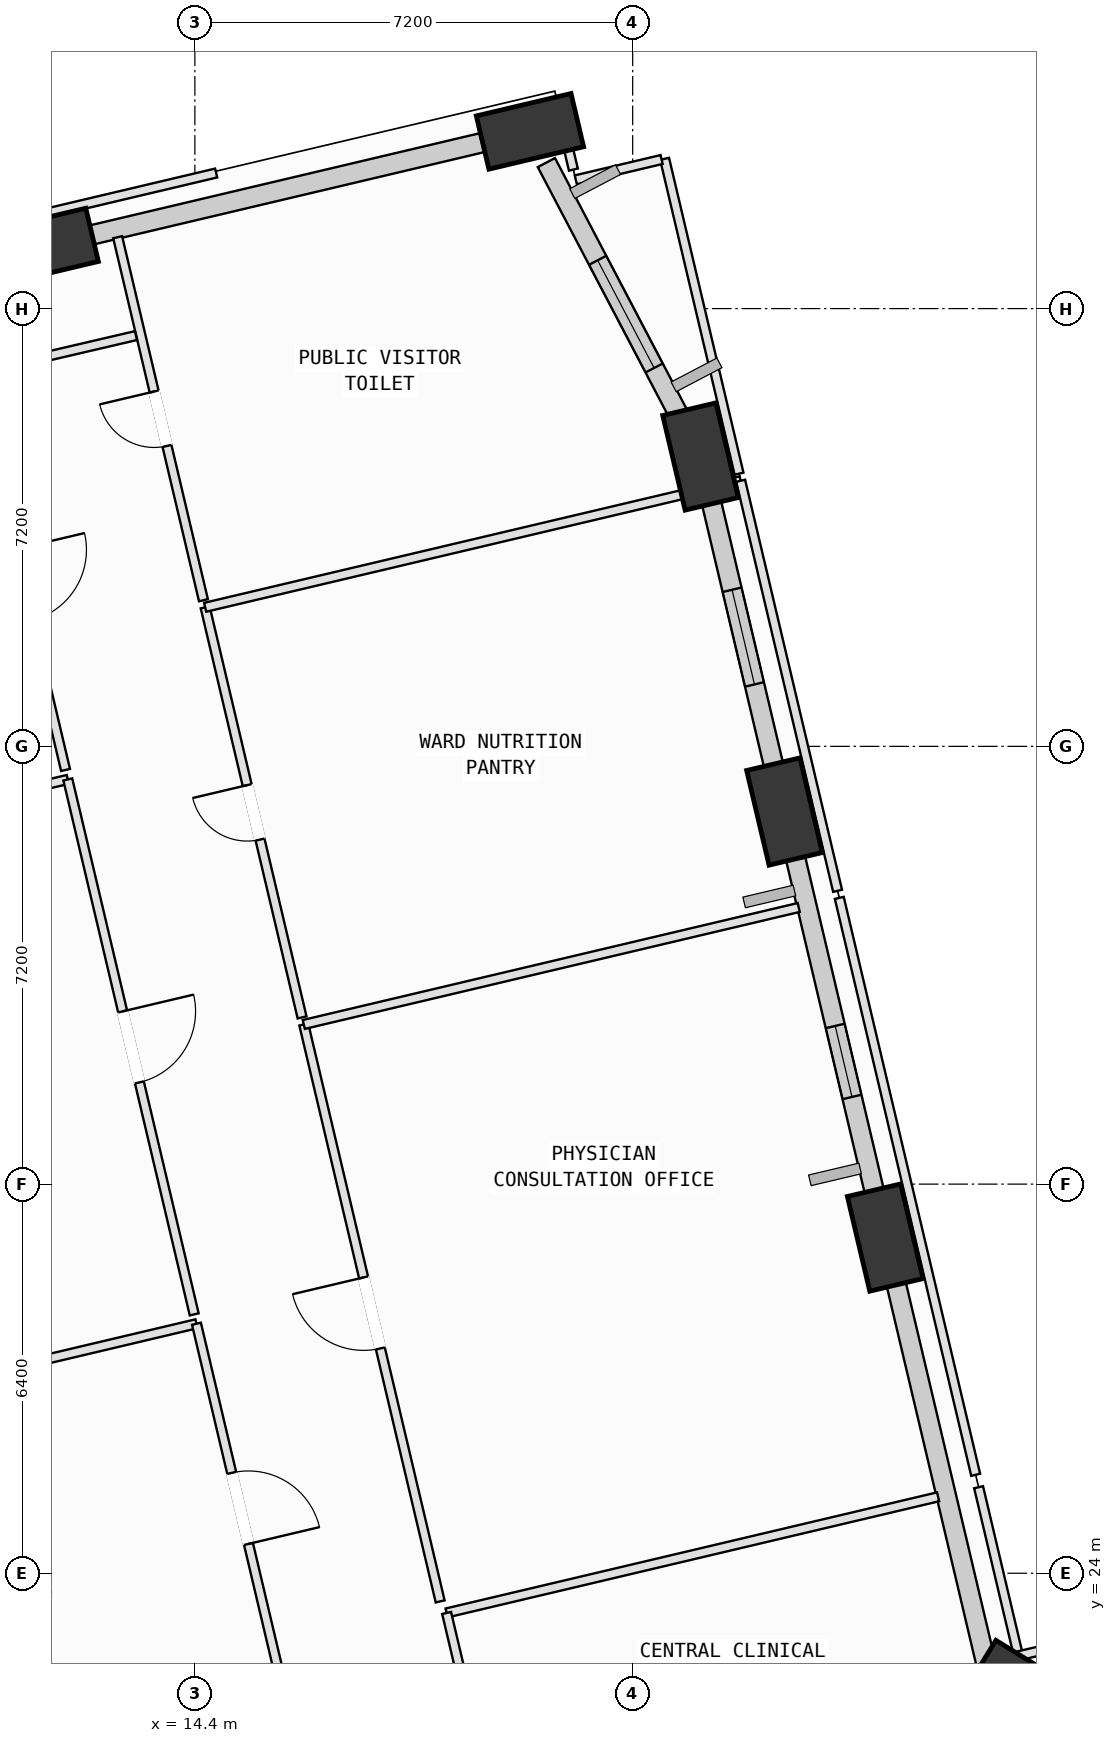
"""IFC4 building model, lengths in metres.
Left out: names, types, materials, properties, quantities, classifications, styles, units other than length and angle.
Written with IfcOpenShell. Run it as: python <this file> out.ifc"""

import sys

from ifc_helpers import new_model, si_unit, direction, frame, frame_2d, origin, origin_2d, place, context, subcontext, project, spatial, rectangle, extrude, element, fill, save


model = new_model("IFC4")
c1 = context("Model", 3, precision=1e-05, world=origin(), true_north=direction((0.0, 1.0)))
c2 = subcontext(c1, "Body", "Model", "MODEL_VIEW")
j1 = project(units=[si_unit("LENGTHUNIT", "METRE"), si_unit("PLANEANGLEUNIT", "RADIAN")], contexts=[c1])
p1 = place(None, origin())
s1 = spatial("IfcSite", under=j1, at=p1, CompositionType="ELEMENT")
p2 = place(p1, origin())
s2 = spatial("IfcBuilding", under=s1, at=p2, CompositionType="ELEMENT")
p3 = place(p2, frame((0.0, 0.0, 79.0)))
s3 = spatial("IfcBuildingStorey", under=s2, at=p3, CompositionType="ELEMENT", Elevation=79.0)
p4 = place(p3, frame((27.536, 21.979, 0.002), z_axis=(0.011862879742, -0.025016539145, 0.999616648948), x_axis=(0.110387943511, 0.993609384183, 0.023556179442)))
e1 = element("IfcColumn", 1, at=p4, inside=s3, PredefinedType="COLUMN", context=c2, shape_type="SweptSolid", body=[
    extrude(rectangle(XDim=1.6, YDim=0.9, at=origin_2d()), origin(), (0.0, 0.0, 1.0), 3.972),
])
p5 = place(p3, frame((25.753, 29.521, 0.002), z_axis=(-0.019332928217, -0.032693582431, 0.999278423441), x_axis=(0.296974112484, 0.954169844595, 0.036963281503)))
e2 = element("IfcColumn", 2, at=p5, inside=s3, PredefinedType="COLUMN", context=c2, shape_type="SweptSolid", body=[
    extrude(rectangle(XDim=1.6, YDim=0.9, at=origin_2d()), origin(), (0.0, 0.0, 1.0), 3.965),
])
p6 = place(p3, frame((24.097, 36.528, 0.002), z_axis=(-0.048168082707, -0.039696930806, 0.998050093679), x_axis=(0.603230951511, 0.795250021524, 0.060743908373)))
e3 = element("IfcColumn", 3, at=p6, inside=s3, PredefinedType="COLUMN", context=c2, shape_type="SweptSolid", body=[
    extrude(rectangle(XDim=1.6, YDim=0.9, at=origin_2d()), origin(), (0.0, 0.0, 1.0), 3.948),
])
p7 = place(p3, frame((22.717, 42.367, 0.002), z_axis=(-0.072160803542, -0.045542587962, 0.996352694137), x_axis=(0.697196380934, 0.71205424328, 0.083041923377)))
e4 = element("IfcColumn", 4, at=p7, inside=s3, PredefinedType="COLUMN", context=c2, shape_type="SweptSolid", body=[
    extrude(rectangle(XDim=1.6, YDim=0.9, at=origin_2d()), origin(), (0.0, 0.0, 1.0), 3.935),
])
p8 = place(p3, frame((19.911, 47.715, 0.002), z_axis=(-0.0939135141, -0.057151316147, 0.993938619298), x_axis=(0.701244074695, -0.712472540273, 0.025290849368)))
e5 = element("IfcColumn", 5, at=p8, inside=s3, PredefinedType="COLUMN", context=c2, shape_type="SweptSolid", body=[
    extrude(rectangle(XDim=1.6, YDim=0.9, at=origin_2d()), origin(), (0.0, 0.0, 1.0), 3.951),
])
p9 = place(p3, frame((11.931, 45.829, 0.002), z_axis=(-0.085748490586, -0.08982880809, 0.992259029487), x_axis=(0.861560195965, -0.506850916025, 0.028568823104)))
e6 = element("IfcColumn", 6, at=p9, inside=s3, PredefinedType="COLUMN", context=c2, shape_type="SweptSolid", body=[
    extrude(rectangle(XDim=1.6, YDim=0.9, at=origin_2d()), origin(), (0.0, 0.0, 1.0), 3.949),
])
p10 = place(p3, frame((28.137, 22.121, 0.0), z_axis=(0.0, 0.0, 1.0), x_axis=(0.973179415544, 0.230047441111, 0.0)))
e7 = element("IfcWall", 7, at=p10, inside=s3, PredefinedType="SOLIDWALL", context=c2, shape_type="SweptSolid", body=[
    extrude(rectangle(XDim=5.736, YDim=0.32, at=frame_2d((2.868, 0.0))), origin(), (0.0, 0.0, 1.0), 3.085),
])
p11 = place(p10, frame((0.928, 0.0, 0.75)))
e8 = element("IfcOpeningElement", 8, at=p11, cuts=e7, PredefinedType="OPENING", context=c2, shape_type="SweptSolid", body=[
    extrude(rectangle(XDim=1.4, YDim=1.85, at=frame_2d((0.7, 0.925))), frame((0.0, 0.17, 0.0), z_axis=(0.0, -1.0, 0.0), x_axis=(1.0, 0.0, 0.0)), (0.0, 0.0, 1.0), 0.34),
])
p12 = place(p3, frame((27.409, 22.518, 0.0), z_axis=(0.0, 0.0, 1.0), x_axis=(-0.230053111414, 0.973178075138, 0.0)))
e9 = element("IfcWall", 9, at=p12, inside=s3, PredefinedType="SOLIDWALL", context=c2, shape_type="SweptSolid", body=[
    extrude(rectangle(XDim=6.536, YDim=0.32, at=frame_2d((3.268, 0.0))), origin(), (0.0, 0.0, 1.0), 2.785),
])
p13 = place(p3, frame((25.627, 30.058, 0.0), z_axis=(0.0, 0.0, 1.0), x_axis=(-0.230071724751, 0.973173674875, 0.0)))
e10 = element("IfcWall", 10, at=p13, inside=s3, PredefinedType="SOLIDWALL", context=c2, shape_type="SweptSolid", body=[
    extrude(rectangle(XDim=5.997, YDim=0.32, at=frame_2d((2.998, 0.0))), origin(), (0.0, 0.0, 1.0), 3.085),
])
p14 = place(p13, frame((1.825, 0.0, 0.75)))
e11 = element("IfcOpeningElement", 11, at=p14, cuts=e10, PredefinedType="OPENING", context=c2, shape_type="SweptSolid", body=[
    extrude(rectangle(XDim=1.2, YDim=1.75, at=frame_2d((0.6, 0.875))), frame((0.0, 0.17, 0.0), z_axis=(0.0, -1.0, 0.0), x_axis=(1.0, 0.0, 0.0)), (0.0, 0.0, 1.0), 0.34),
])
p15 = place(p3, frame((23.972, 37.056, 0.0), z_axis=(0.0, 0.0, 1.0), x_axis=(-0.230076078853, 0.973172645495, 0.0)))
e12 = element("IfcWall", 12, at=p15, inside=s3, PredefinedType="SOLIDWALL", context=c2, shape_type="SweptSolid", body=[
    extrude(rectangle(XDim=4.816, YDim=0.32, at=frame_2d((2.408, 0.0))), origin(), (0.0, 0.0, 1.0), 3.085),
])
p16 = place(p15, frame((1.606, 0.0, 0.75)))
e13 = element("IfcOpeningElement", 13, at=p16, cuts=e12, PredefinedType="OPENING", context=c2, shape_type="SweptSolid", body=[
    extrude(rectangle(XDim=1.6, YDim=1.95, at=frame_2d((0.8, 0.975))), frame((0.0, 0.17, 0.0), z_axis=(0.0, -1.0, 0.0), x_axis=(1.0, 0.0, 0.0)), (0.0, 0.0, 1.0), 0.34),
])
p17 = place(p3, frame((20.181, 47.201, 0.0), z_axis=(0.0, 0.0, 1.0), x_axis=(0.464527536286, -0.885558675657, 0.0)))
e14 = element("IfcWall", 14, at=p17, inside=s3, PredefinedType="SOLIDWALL", context=c2, shape_type="SweptSolid", body=[
    extrude(rectangle(XDim=4.889, YDim=0.32, at=frame_2d((2.444, 0.0))), origin(), (0.0, 0.0, 1.0), 3.085),
])
p18 = place(p17, frame((1.815, 0.0, 0.75)))
e15 = element("IfcOpeningElement", 15, at=p18, cuts=e14, PredefinedType="OPENING", context=c2, shape_type="SweptSolid", body=[
    extrude(rectangle(XDim=2.0, YDim=1.95, at=frame_2d((1.0, 0.975))), frame((0.0, 0.17, 0.0), z_axis=(0.0, -1.0, 0.0), x_axis=(1.0, 0.0, 0.0)), (0.0, 0.0, 1.0), 0.34),
])
p19 = place(p3, frame((12.303, 45.917, 0.0), z_axis=(0.0, 0.0, 1.0), x_axis=(0.973179362637, 0.230047664925, 0.0)))
e16 = element("IfcWall", 16, at=p19, inside=s3, PredefinedType="SOLIDWALL", context=c2, shape_type="SweptSolid", body=[
    extrude(rectangle(XDim=7.003, YDim=0.32, at=frame_2d((3.501, 0.0))), origin(), (0.0, 0.0, 1.0), 3.085),
])
p20 = place(p3, frame((5.263, 25.937, 0.0), z_axis=(0.0, 0.0, 1.0), x_axis=(0.973179969002, 0.230045099781, 0.0)))
e17 = element("IfcWall", 17, at=p20, inside=s3, PredefinedType="PARTITIONING", context=c2, shape_type="SweptSolid", body=[
    extrude(rectangle(XDim=9.416, YDim=0.15, at=frame_2d((4.708, 0.0))), origin(), (0.0, 0.0, 1.0), 3.7),
])
p21 = place(p3, frame((14.426, 28.103, 0.0), z_axis=(0.0, 0.0, 1.0), x_axis=(0.229968189108, -0.973198146319, 0.0)))
e18 = element("IfcWall", 18, at=p21, inside=s3, PredefinedType="PARTITIONING", context=c2, shape_type="SweptSolid", body=[
    extrude(rectangle(XDim=6.24, YDim=0.15, at=frame_2d((3.12, 0.0))), origin(), (0.0, 0.0, 1.0), 3.7),
])
p22 = place(p21, frame((2.52, 0.0, 0.0)))
e19 = element("IfcOpeningElement", 19, at=p22, cuts=e18, PredefinedType="OPENING", context=c2, shape_type="SweptSolid", body=[
    extrude(rectangle(XDim=1.2, YDim=2.15, at=frame_2d((0.6, 1.075))), frame((0.0, 0.085, 0.0), z_axis=(0.0, -1.0, 0.0), x_axis=(1.0, 0.0, 0.0)), (0.0, 0.0, 1.0), 0.17),
])
p23 = place(p3, frame((3.147, 34.89, 0.0), z_axis=(0.0, 0.0, 1.0), x_axis=(0.973179969002, 0.230045099781, 0.0)))
e20 = element("IfcWall", 20, at=p23, inside=s3, PredefinedType="PARTITIONING", context=c2, shape_type="SweptSolid", body=[
    extrude(rectangle(XDim=9.416, YDim=0.15, at=frame_2d((4.708, 0.0))), origin(), (0.0, 0.0, 1.0), 3.7),
])
p24 = place(p3, frame((12.31, 37.056, 0.0), z_axis=(0.0, 0.0, 1.0), x_axis=(0.229958952192, -0.97320032897, 0.0)))
e21 = element("IfcWall", 21, at=p24, inside=s3, PredefinedType="PARTITIONING", context=c2, shape_type="SweptSolid", body=[
    extrude(rectangle(XDim=9.04, YDim=0.15, at=frame_2d((4.52, 0.0))), origin(), (0.0, 0.0, 1.0), 2.785),
])
p25 = place(p24, frame((3.92, 0.0, 0.0)))
e22 = element("IfcOpeningElement", 22, at=p25, cuts=e21, PredefinedType="OPENING", context=c2, shape_type="SweptSolid", body=[
    extrude(rectangle(XDim=1.2, YDim=2.15, at=frame_2d((0.6, 1.075))), frame((0.0, 0.085, 0.0), z_axis=(0.0, -1.0, 0.0), x_axis=(1.0, 0.0, 0.0)), (0.0, 0.0, 1.0), 0.17),
])
p26 = place(p3, frame((10.837, 43.284, 0.0), z_axis=(0.0, 0.0, 1.0), x_axis=(0.230151448384, -0.973154823657, 0.0)))
e23 = element("IfcWall", 23, at=p26, inside=s3, PredefinedType="PARTITIONING", context=c2, shape_type="SweptSolid", body=[
    extrude(rectangle(XDim=6.24, YDim=0.15, at=frame_2d((3.12, 0.0))), origin(), (0.0, 0.0, 1.0), 2.785),
])
p27 = place(p26, frame((2.52, 0.0, 0.0)))
e24 = element("IfcOpeningElement", 24, at=p27, cuts=e23, PredefinedType="OPENING", context=c2, shape_type="SweptSolid", body=[
    extrude(rectangle(XDim=1.2, YDim=2.15, at=frame_2d((0.6, 1.075))), frame((0.0, 0.085, 0.0), z_axis=(0.0, -1.0, 0.0), x_axis=(1.0, 0.0, 0.0)), (0.0, 0.0, 1.0), 0.17),
])
p28 = place(p3, frame((18.54, 23.347, 0.0), z_axis=(0.0, 0.0, 1.0), x_axis=(0.97319466158, 0.229982935611, 0.0)))
e25 = element("IfcWall", 25, at=p28, inside=s3, PredefinedType="PARTITIONING", context=c2, shape_type="SweptSolid", body=[
    extrude(rectangle(XDim=8.306, YDim=0.15, at=frame_2d((4.153, 0.0))), origin(), (0.0, 0.0, 1.0), 3.7),
])
p29 = place(p3, frame((27.289, 25.415, 0.0), z_axis=(0.0, 0.0, 1.0), x_axis=(0.230141967598, -0.973157065817, 0.0)))
e26 = element("IfcWall", 26, at=p29, inside=s3, PredefinedType="PARTITIONING", context=c2, shape_type="SweptSolid", body=[
    extrude(rectangle(XDim=2.85, YDim=0.15, at=frame_2d((1.425, 0.0))), origin(), (0.0, 0.0, 1.0), 3.7),
])
p30 = place(p3, frame((27.945, 22.641, 0.0), z_axis=(0.0, 0.0, 1.0), x_axis=(0.973146335826, 0.230187334728, 0.0)))
e27 = element("IfcWall", 27, at=p30, inside=s3, PredefinedType="PARTITIONING", context=c2, shape_type="SweptSolid", body=[
    extrude(rectangle(XDim=3.532, YDim=0.15, at=frame_2d((1.766, 0.0))), origin(), (0.0, 0.0, 1.0), 3.7),
])
p31 = place(p3, frame((19.194, 20.58, 0.0), z_axis=(0.0, 0.0, 1.0), x_axis=(-0.230049112819, 0.973179020372, 0.0)))
e28 = element("IfcWall", 28, at=p31, inside=s3, PredefinedType="PARTITIONING", context=c2, shape_type="SweptSolid", body=[
    extrude(rectangle(XDim=2.843, YDim=0.15, at=frame_2d((1.421, 0.0))), origin(), (0.0, 0.0, 1.0), 3.7),
])
p32 = place(p3, frame((18.434, 23.537, 0.0), z_axis=(0.0, 0.0, 1.0), x_axis=(-0.23006080979, 0.973176255258, 0.0)))
e29 = element("IfcWall", 29, at=p32, inside=s3, PredefinedType="PARTITIONING", context=c2, shape_type="SweptSolid", body=[
    extrude(rectangle(XDim=9.75, YDim=0.15, at=frame_2d((4.875, 0.0))), origin(), (0.0, 0.0, 1.0), 3.7),
])
p33 = place(p32, frame((4.275, 0.0, 0.0)))
e30 = element("IfcOpeningElement", 30, at=p33, cuts=e29, PredefinedType="OPENING", context=c2, shape_type="SweptSolid", body=[
    extrude(rectangle(XDim=1.2, YDim=2.15, at=frame_2d((0.6, 1.075))), frame((0.0, 0.085, 0.0), z_axis=(0.0, -1.0, 0.0), x_axis=(1.0, 0.0, 0.0)), (0.0, 0.0, 1.0), 0.17),
])
p34 = place(p3, frame((16.191, 33.026, 0.0), z_axis=(0.0, 0.0, 1.0), x_axis=(0.973183543578, 0.230029977414, 0.0)))
e31 = element("IfcWall", 31, at=p34, inside=s3, PredefinedType="PARTITIONING", context=c2, shape_type="SweptSolid", body=[
    extrude(rectangle(XDim=8.365, YDim=0.15, at=frame_2d((4.182, 0.0))), origin(), (0.0, 0.0, 1.0), 3.7),
])
p35 = place(p3, frame((24.998, 35.108, 0.0), z_axis=(0.0, 0.0, 1.0), x_axis=(0.230031490205, -0.973183186001, 0.0)))
e32 = element("IfcWall", 32, at=p35, inside=s3, PredefinedType="PARTITIONING", context=c2, shape_type="SweptSolid", body=[
    extrude(rectangle(XDim=9.75, YDim=0.15, at=frame_2d((4.875, 0.0))), origin(), (0.0, 0.0, 1.0), 3.7),
])
p36 = place(p3, frame((16.163, 33.142, 0.0), z_axis=(0.0, 0.0, 1.0), x_axis=(-0.229991484935, 0.973192641185, 0.0)))
e33 = element("IfcWall", 33, at=p36, inside=s3, PredefinedType="PARTITIONING", context=c2, shape_type="SweptSolid", body=[
    extrude(rectangle(XDim=6.931, YDim=0.15, at=frame_2d((3.465, 0.0))), origin(), (0.0, 0.0, 1.0), 3.7),
])
p37 = place(p36, frame((3.005, 0.0, 0.0)))
e34 = element("IfcOpeningElement", 34, at=p37, cuts=e33, PredefinedType="OPENING", context=c2, shape_type="SweptSolid", body=[
    extrude(rectangle(XDim=0.92, YDim=2.1, at=frame_2d((0.46, 1.05))), frame((0.0, 0.085, 0.0), z_axis=(0.0, -1.0, 0.0), x_axis=(1.0, 0.0, 0.0)), (0.0, 0.0, 1.0), 0.17),
])
p38 = place(p3, frame((14.569, 39.887, 0.0), z_axis=(0.0, 0.0, 1.0), x_axis=(0.973198198555, 0.229967968052, 0.0)))
e35 = element("IfcWall", 35, at=p38, inside=s3, PredefinedType="PARTITIONING", context=c2, shape_type="SweptSolid", body=[
    extrude(rectangle(XDim=8.41, YDim=0.15, at=frame_2d((4.205, 0.0))), origin(), (0.0, 0.0, 1.0), 3.7),
])
p39 = place(p3, frame((22.928, 41.862, 0.0), z_axis=(0.0, 0.0, 1.0), x_axis=(0.973152225554, 0.230162433728, 0.0)))
e36 = element("IfcWall", 36, at=p39, inside=s3, PredefinedType="PARTITIONING", context=c2, shape_type="SweptSolid", body=[
    extrude(rectangle(XDim=0.46, YDim=0.15, at=frame_2d((0.23, 0.0))), origin(), (0.0, 0.0, 1.0), 3.7),
])
p40 = place(p3, frame((23.376, 41.968, 0.0), z_axis=(0.0, 0.0, 1.0), x_axis=(0.230023027249, -0.973185186352, 0.0)))
e37 = element("IfcWall", 37, at=p40, inside=s3, PredefinedType="PARTITIONING", context=c2, shape_type="SweptSolid", body=[
    extrude(rectangle(XDim=6.93, YDim=0.15, at=frame_2d((3.465, 0.0))), origin(), (0.0, 0.0, 1.0), 3.7),
])
p41 = place(p3, frame((22.125, 47.263, 0.0), z_axis=(0.0, 0.0, 1.0), x_axis=(0.230067330592, -0.973174713705, 0.0)))
e38 = element("IfcWall", 38, at=p41, inside=s3, PredefinedType="PARTITIONING", context=c2, shape_type="SweptSolid", body=[
    extrude(rectangle(XDim=5.321, YDim=0.15, at=frame_2d((2.66, 0.0))), origin(), (0.0, 0.0, 1.0), 3.7),
])
p42 = place(p3, frame((14.541, 40.003, 0.0), z_axis=(0.0, 0.0, 1.0), x_axis=(-0.229988453932, 0.973193357488, 0.0)))
e39 = element("IfcWall", 39, at=p42, inside=s3, PredefinedType="PARTITIONING", context=c2, shape_type="SweptSolid", body=[
    extrude(rectangle(XDim=6.136, YDim=0.15, at=frame_2d((3.068, 0.0))), origin(), (0.0, 0.0, 1.0), 3.7),
])
p43 = place(p42, frame((2.608, 0.0, 0.0)))
e40 = element("IfcOpeningElement", 40, at=p43, cuts=e39, PredefinedType="OPENING", context=c2, shape_type="SweptSolid", body=[
    extrude(rectangle(XDim=0.92, YDim=2.1, at=frame_2d((0.46, 1.05))), frame((0.0, 0.085, 0.0), z_axis=(0.0, -1.0, 0.0), x_axis=(1.0, 0.0, 0.0)), (0.0, 0.0, 1.0), 0.17),
])
p44 = place(p3, frame((19.075, 47.713, 0.0), z_axis=(0.0, 0.0, 1.0), x_axis=(0.973137266484, 0.230225673155, 0.0)))
e41 = element("IfcWall", 41, at=p44, inside=s3, PredefinedType="PARTITIONING", context=c2, shape_type="SweptSolid", body=[
    extrude(rectangle(XDim=1.365, YDim=0.15, at=frame_2d((0.682, 0.0))), origin(), (0.0, 0.0, 1.0), 3.085),
])
p45 = place(p3, frame((20.414, 47.978, 0.0), z_axis=(0.0, 0.0, 1.0), x_axis=(0.230108003327, -0.973165097404, 0.0)))
e42 = element("IfcWall", 42, at=p45, inside=s3, PredefinedType="PARTITIONING", context=c2, shape_type="SweptSolid", body=[
    extrude(rectangle(XDim=0.917, YDim=0.15, at=frame_2d((0.458, 0.0))), origin(), (0.0, 0.0, 1.0), 3.7),
])
p46 = place(p3, frame((20.665, 46.918, 0.0), z_axis=(0.0, 0.0, 1.0), x_axis=(0.97310711236, 0.23035309391, 0.0)))
e43 = element("IfcWall", 43, at=p46, inside=s3, PredefinedType="PARTITIONING", context=c2, shape_type="SweptSolid", body=[
    extrude(rectangle(XDim=1.45, YDim=0.15, at=frame_2d((0.725, 0.0))), origin(), (0.0, 0.0, 1.0), 3.7),
])
p47 = place(p3, frame((13.431, 44.356, 0.0), z_axis=(0.0, 0.0, 1.0), x_axis=(-0.973916009073, -0.226908808272, 0.0)))
e44 = element("IfcWall", 44, at=p47, inside=s3, PredefinedType="PARTITIONING", context=c2, shape_type="SweptSolid", body=[
    extrude(rectangle(XDim=2.67, YDim=0.15, at=frame_2d((1.335, 0.0))), origin(), (0.0, 0.0, 1.0), 3.7),
])
p48 = place(p3, frame((8.289, 45.502, 0.0), z_axis=(0.0, 0.0, 1.0), x_axis=(0.973152723779, 0.230160327166, 0.0)))
e45 = element("IfcWall", 45, at=p48, inside=s3, PredefinedType="PARTITIONING", context=c2, shape_type="SweptSolid", body=[
    extrude(rectangle(XDim=6.639, YDim=0.15, at=frame_2d((3.32, 0.0))), origin(), (0.0, 0.0, 1.0), 3.7),
])
p49 = place(p14, origin())
e46 = element("IfcWindow", 46, at=p49, inside=s3, PartitioningType="SINGLE_PANEL", PredefinedType="WINDOW", context=c2, shape_type="SweptSolid", body=[
    extrude(rectangle(XDim=1.2, YDim=1.75, at=frame_2d((0.6, 0.875))), frame((0.0, 0.03, 0.0), z_axis=(0.0, -1.0, 0.0), x_axis=(1.0, 0.0, 0.0)), (0.0, 0.0, 1.0), 0.06),
])
fill(e11, e46)
p50 = place(p16, origin())
e47 = element("IfcWindow", 47, at=p50, inside=s3, PartitioningType="SINGLE_PANEL", PredefinedType="WINDOW", context=c2, shape_type="SweptSolid", body=[
    extrude(rectangle(XDim=1.6, YDim=1.95, at=frame_2d((0.8, 0.975))), frame((0.0, 0.03, 0.0), z_axis=(0.0, -1.0, 0.0), x_axis=(1.0, 0.0, 0.0)), (0.0, 0.0, 1.0), 0.06),
])
fill(e13, e47)
p51 = place(p18, origin())
e48 = element("IfcWindow", 48, at=p51, inside=s3, PartitioningType="SINGLE_PANEL", PredefinedType="WINDOW", context=c2, shape_type="SweptSolid", body=[
    extrude(rectangle(XDim=2.0, YDim=1.95, at=frame_2d((1.0, 0.975))), frame((0.0, 0.03, 0.0), z_axis=(0.0, -1.0, 0.0), x_axis=(1.0, 0.0, 0.0)), (0.0, 0.0, 1.0), 0.06),
])
fill(e15, e48)
p52 = place(p22, origin())
e49 = element("IfcDoor", 49, at=p52, inside=s3, OperationType="SINGLE_SWING_RIGHT", PredefinedType="DOOR", context=c2, shape_type="SweptSolid", body=[
    extrude(rectangle(XDim=1.2, YDim=2.15, at=frame_2d((0.6, 1.075))), frame((0.0, 0.025, 0.0), z_axis=(0.0, -1.0, 0.0), x_axis=(1.0, 0.0, 0.0)), (0.0, 0.0, 1.0), 0.05),
])
fill(e19, e49)
p53 = place(p25, origin())
e50 = element("IfcDoor", 50, at=p53, inside=s3, OperationType="SINGLE_SWING_LEFT", PredefinedType="DOOR", context=c2, shape_type="SweptSolid", body=[
    extrude(rectangle(XDim=1.2, YDim=2.15, at=frame_2d((0.6, 1.075))), frame((0.0, 0.025, 0.0), z_axis=(0.0, -1.0, 0.0), x_axis=(1.0, 0.0, 0.0)), (0.0, 0.0, 1.0), 0.05),
])
fill(e22, e50)
p54 = place(p33, origin())
e51 = element("IfcDoor", 51, at=p54, inside=s3, OperationType="SINGLE_SWING_RIGHT", PredefinedType="DOOR", context=c2, shape_type="SweptSolid", body=[
    extrude(rectangle(XDim=1.2, YDim=2.15, at=frame_2d((0.6, 1.075))), frame((0.0, 0.025, 0.0), z_axis=(0.0, -1.0, 0.0), x_axis=(1.0, 0.0, 0.0)), (0.0, 0.0, 1.0), 0.05),
])
fill(e30, e51)
p55 = place(p37, origin())
e52 = element("IfcDoor", 52, at=p55, inside=s3, OperationType="SINGLE_SWING_RIGHT", PredefinedType="DOOR", context=c2, shape_type="SweptSolid", body=[
    extrude(rectangle(XDim=0.92, YDim=2.1, at=frame_2d((0.46, 1.05))), frame((0.0, 0.025, 0.0), z_axis=(0.0, -1.0, 0.0), x_axis=(1.0, 0.0, 0.0)), (0.0, 0.0, 1.0), 0.05),
])
fill(e34, e52)
p56 = place(p43, origin())
e53 = element("IfcDoor", 53, at=p56, inside=s3, OperationType="SINGLE_SWING_RIGHT", PredefinedType="DOOR", context=c2, shape_type="SweptSolid", body=[
    extrude(rectangle(XDim=0.92, YDim=2.1, at=frame_2d((0.46, 1.05))), frame((0.0, 0.025, 0.0), z_axis=(0.0, -1.0, 0.0), x_axis=(1.0, 0.0, 0.0)), (0.0, 0.0, 1.0), 0.05),
])
fill(e40, e53)
save(model, sys.argv[1])
